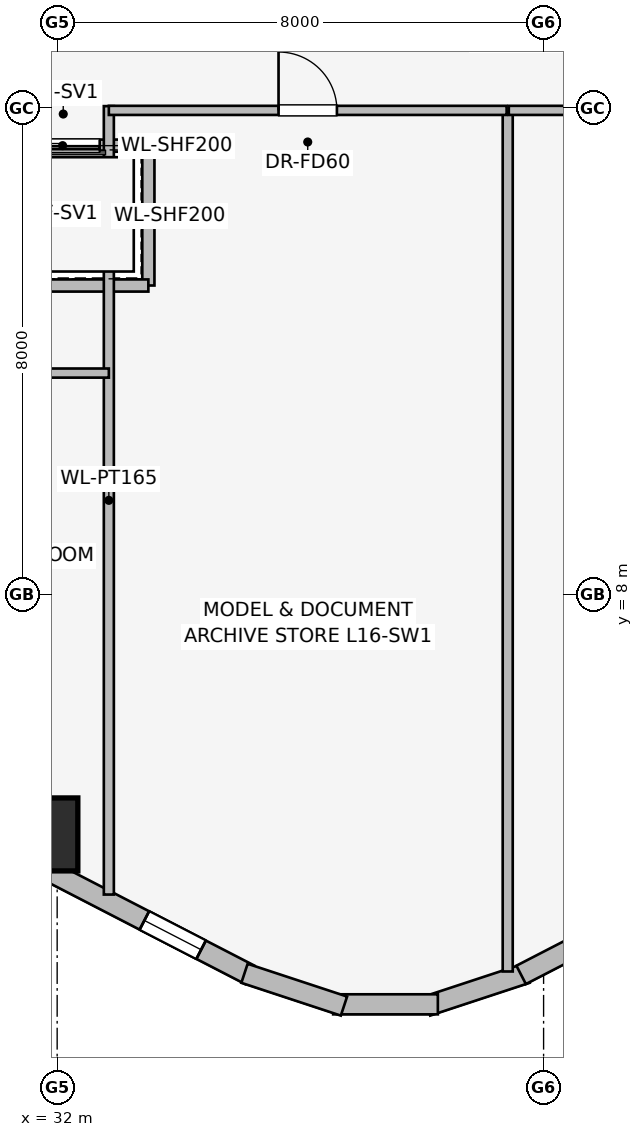
"""IFC4 building model, lengths in metres.
Left out: names, types, materials, properties, quantities, classifications, styles, units other than length and angle.
Written with IfcOpenShell. Run it as: python <this file> out.ifc"""

import sys

from ifc_helpers import new_model, si_unit, direction, frame, frame_2d, origin, origin_2d, place, context, subcontext, project, spatial, rectangle, extrude, element, fill, save


model = new_model("IFC4")
c1 = context("Model", 3, precision=1e-05, world=origin(), true_north=direction((0.0, 1.0)))
c2 = subcontext(c1, "Body", "Model", "MODEL_VIEW")
j1 = project(units=[si_unit("LENGTHUNIT", "METRE"), si_unit("PLANEANGLEUNIT", "RADIAN")], contexts=[c1])
p1 = place(None, origin())
s1 = spatial("IfcSite", under=j1, at=p1, CompositionType="ELEMENT")
p2 = place(p1, origin())
s2 = spatial("IfcBuilding", under=s1, at=p2, CompositionType="ELEMENT")
p3 = place(p2, frame((0.0, 0.0, 63.5)))
s3 = spatial("IfcBuildingStorey", under=s2, at=p3, CompositionType="ELEMENT", Elevation=63.5)
p4 = place(p3, frame((31.74, 4.053, 0.0), z_axis=(0.0, 0.0, 1.0), x_axis=(1.0, 0.0, 0.0)))
e1 = element("IfcColumn", 1, at=p4, inside=s3, PredefinedType="COLUMN", context=c2, shape_type="SweptSolid", body=[
    extrude(rectangle(XDim=1.2, YDim=1.2, at=origin_2d()), origin(), (0.0, 0.0, 1.0), 3.65),
])
p5 = place(p3, frame((35.169, 1.743, 0.0), z_axis=(0.0, 0.0, 1.0), x_axis=(-0.888634413993, 0.458616264721, 0.0)))
e2 = element("IfcWall", 2, at=p5, inside=s3, PredefinedType="STANDARD", context=c2, shape_type="SweptSolid", body=[
    extrude(rectangle(XDim=20.531, YDim=0.34, at=frame_2d((10.266, 0.0))), origin(), (0.0, 0.0, 1.0), 2.684),
])
p6 = place(p5, frame((0.902, 0.0, 0.75)))
e3 = element("IfcOpeningElement", 3, at=p6, cuts=e2, PredefinedType="OPENING", context=c2, shape_type="SweptSolid", body=[
    extrude(rectangle(XDim=1.05, YDim=1.4, at=frame_2d((0.525, 0.7))), frame((0.0, 0.18, 0.0), z_axis=(0.0, -1.0, 0.0), x_axis=(1.0, 0.0, 0.0)), (0.0, 0.0, 1.0), 0.36),
])
p7 = place(p5, frame((5.903, 0.0, 0.75)))
e4 = element("IfcOpeningElement", 4, at=p7, cuts=e2, PredefinedType="OPENING", context=c2, shape_type="SweptSolid", body=[
    extrude(rectangle(XDim=1.5, YDim=1.5, at=frame_2d((0.75, 0.75))), frame((0.0, 0.18, 0.0), z_axis=(0.0, -1.0, 0.0), x_axis=(1.0, 0.0, 0.0)), (0.0, 0.0, 1.0), 0.36),
])
p8 = place(p5, frame((9.516, 0.0, 0.75)))
e5 = element("IfcOpeningElement", 5, at=p8, cuts=e2, PredefinedType="OPENING", context=c2, shape_type="SweptSolid", body=[
    extrude(rectangle(XDim=1.5, YDim=1.5, at=frame_2d((0.75, 0.75))), frame((0.0, 0.18, 0.0), z_axis=(0.0, -1.0, 0.0), x_axis=(1.0, 0.0, 0.0)), (0.0, 0.0, 1.0), 0.36),
])
p9 = place(p5, frame((13.129, 0.0, 0.75)))
e6 = element("IfcOpeningElement", 6, at=p9, cuts=e2, PredefinedType="OPENING", context=c2, shape_type="SweptSolid", body=[
    extrude(rectangle(XDim=1.5, YDim=1.5, at=frame_2d((0.75, 0.75))), frame((0.0, 0.18, 0.0), z_axis=(0.0, -1.0, 0.0), x_axis=(1.0, 0.0, 0.0)), (0.0, 0.0, 1.0), 0.36),
])
p10 = place(p5, frame((17.673, 0.0, 0.75)))
e7 = element("IfcOpeningElement", 7, at=p10, cuts=e2, PredefinedType="OPENING", context=c2, shape_type="SweptSolid", body=[
    extrude(rectangle(XDim=1.8, YDim=1.5, at=frame_2d((0.9, 0.75))), frame((0.0, 0.18, 0.0), z_axis=(0.0, -1.0, 0.0), x_axis=(1.0, 0.0, 0.0)), (0.0, 0.0, 1.0), 0.36),
])
p11 = place(p3, frame((39.719, 1.769, 0.0), z_axis=(0.0, 0.0, 1.0), x_axis=(-0.94976901097, -0.312951794691, 0.0)))
e8 = element("IfcWall", 8, at=p11, inside=s3, PredefinedType="STANDARD", context=c2, shape_type="SweptSolid", body=[
    extrude(rectangle(XDim=1.722, YDim=0.33, at=frame_2d((0.861, 0.0))), origin(), (0.0, 0.0, 1.0), 3.39),
])
p12 = place(p3, frame((38.261, 1.259, 0.0), z_axis=(0.0, 0.0, 1.0), x_axis=(-1.0, 0.0, 0.0)))
e9 = element("IfcWall", 9, at=p12, inside=s3, PredefinedType="STANDARD", context=c2, shape_type="SweptSolid", body=[
    extrude(rectangle(XDim=1.722, YDim=0.33, at=frame_2d((0.861, 0.0))), origin(), (0.0, 0.0, 1.0), 3.39),
])
p13 = place(p3, frame((36.717, 1.23, 0.0), z_axis=(0.0, 0.0, 1.0), x_axis=(-0.94976901097, 0.312951794691, 0.0)))
e10 = element("IfcWall", 10, at=p13, inside=s3, PredefinedType="STANDARD", context=c2, shape_type="SweptSolid", body=[
    extrude(rectangle(XDim=1.722, YDim=0.33, at=frame_2d((0.861, 0.0))), origin(), (0.0, 0.0, 1.0), 3.39),
])
p14 = place(p3, frame((57.876, 11.159, 0.0), z_axis=(0.0, 0.0, 1.0), x_axis=(-0.888634413993, -0.458616264721, 0.0)))
e11 = element("IfcWall", 11, at=p14, inside=s3, PredefinedType="STANDARD", context=c2, shape_type="SweptSolid", body=[
    extrude(rectangle(XDim=20.531, YDim=0.34, at=frame_2d((10.266, 0.0))), origin(), (0.0, 0.0, 1.0), 2.684),
])
p15 = place(p14, frame((1.032, 0.0, 0.75)))
e12 = element("IfcOpeningElement", 12, at=p15, cuts=e11, PredefinedType="OPENING", context=c2, shape_type="SweptSolid", body=[
    extrude(rectangle(XDim=1.8, YDim=1.5, at=frame_2d((0.9, 0.75))), frame((0.0, 0.18, 0.0), z_axis=(0.0, -1.0, 0.0), x_axis=(1.0, 0.0, 0.0)), (0.0, 0.0, 1.0), 0.36),
])
p16 = place(p14, frame((5.082, 0.0, 0.75)))
e13 = element("IfcOpeningElement", 13, at=p16, cuts=e11, PredefinedType="OPENING", context=c2, shape_type="SweptSolid", body=[
    extrude(rectangle(XDim=1.5, YDim=1.5, at=frame_2d((0.75, 0.75))), frame((0.0, 0.18, 0.0), z_axis=(0.0, -1.0, 0.0), x_axis=(1.0, 0.0, 0.0)), (0.0, 0.0, 1.0), 0.36),
])
p17 = place(p14, frame((7.055, 0.0, 0.75)))
e14 = element("IfcOpeningElement", 14, at=p17, cuts=e11, PredefinedType="OPENING", context=c2, shape_type="SweptSolid", body=[
    extrude(rectangle(XDim=1.5, YDim=1.5, at=frame_2d((0.75, 0.75))), frame((0.0, 0.18, 0.0), z_axis=(0.0, -1.0, 0.0), x_axis=(1.0, 0.0, 0.0)), (0.0, 0.0, 1.0), 0.36),
])
p18 = place(p14, frame((10.158, 0.0, 0.75)))
e15 = element("IfcOpeningElement", 15, at=p18, cuts=e11, PredefinedType="OPENING", context=c2, shape_type="SweptSolid", body=[
    extrude(rectangle(XDim=1.8, YDim=1.5, at=frame_2d((0.9, 0.75))), frame((0.0, 0.18, 0.0), z_axis=(0.0, -1.0, 0.0), x_axis=(1.0, 0.0, 0.0)), (0.0, 0.0, 1.0), 0.36),
])
p19 = place(p14, frame((13.243, 0.0, 0.75)))
e16 = element("IfcOpeningElement", 16, at=p19, cuts=e11, PredefinedType="OPENING", context=c2, shape_type="SweptSolid", body=[
    extrude(rectangle(XDim=1.8, YDim=1.5, at=frame_2d((0.9, 0.75))), frame((0.0, 0.18, 0.0), z_axis=(0.0, -1.0, 0.0), x_axis=(1.0, 0.0, 0.0)), (0.0, 0.0, 1.0), 0.36),
])
p20 = place(p14, frame((17.823, 0.0, 0.75)))
e17 = element("IfcOpeningElement", 17, at=p20, cuts=e11, PredefinedType="OPENING", context=c2, shape_type="SweptSolid", body=[
    extrude(rectangle(XDim=1.5, YDim=1.5, at=frame_2d((0.75, 0.75))), frame((0.0, 0.18, 0.0), z_axis=(0.0, -1.0, 0.0), x_axis=(1.0, 0.0, 0.0)), (0.0, 0.0, 1.0), 0.36),
])
p21 = place(p3, frame((33.5, 15.38, 0.0), z_axis=(0.0, 0.0, 1.0), x_axis=(-1.0, 0.0, 0.0)))
e18 = element("IfcWall", 18, at=p21, inside=s3, PredefinedType="PARTITIONING", context=c2, shape_type="SweptSolid", body=[
    extrude(rectangle(XDim=2.82, YDim=0.2, at=frame_2d((1.41, 0.0))), origin(), (0.0, 0.0, 1.0), 3.39),
])
p22 = place(p21, frame((0.8, 0.0, 0.0)))
e19 = element("IfcOpeningElement", 19, at=p22, cuts=e18, PredefinedType="OPENING", context=c2, shape_type="SweptSolid", body=[
    extrude(rectangle(XDim=1.2, YDim=2.2, at=frame_2d((0.6, 1.1))), frame((0.0, 0.11, 0.0), z_axis=(0.0, -1.0, 0.0), x_axis=(1.0, 0.0, 0.0)), (0.0, 0.0, 1.0), 0.22),
])
p23 = place(p3, frame((33.5, 13.08, 0.0), z_axis=(0.0, 0.0, 1.0), x_axis=(0.0, 1.0, 0.0)))
e20 = element("IfcWall", 20, at=p23, inside=s3, PredefinedType="PARTITIONING", context=c2, shape_type="SweptSolid", body=[
    extrude(rectangle(XDim=2.3, YDim=0.2, at=frame_2d((1.15, 0.0))), origin(), (0.0, 0.0, 1.0), 3.39),
])
p24 = place(p3, frame((30.879, 13.08, 0.0), z_axis=(0.0, 0.0, 1.0), x_axis=(1.0, 0.0, 0.0)))
e21 = element("IfcWall", 21, at=p24, inside=s3, PredefinedType="PARTITIONING", context=c2, shape_type="SweptSolid", body=[
    extrude(rectangle(XDim=2.621, YDim=0.2, at=frame_2d((1.311, 0.0))), origin(), (0.0, 0.0, 1.0), 3.39),
])
p25 = place(p3, frame((32.85, 3.064, 0.0), z_axis=(0.0, 0.0, 1.0), x_axis=(0.0, 1.0, 0.0)))
e22 = element("IfcWall", 22, at=p25, inside=s3, PredefinedType="PARTITIONING", context=c2, shape_type="SweptSolid", body=[
    extrude(rectangle(XDim=12.966, YDim=0.165, at=frame_2d((6.483, 0.0))), origin(), (0.0, 0.0, 1.0), 3.39),
])
p26 = place(p3, frame((16.487, 11.64, 0.0), z_axis=(0.0, 0.0, 1.0), x_axis=(1.0, 0.0, 0.0)))
e23 = element("IfcWall", 23, at=p26, inside=s3, PredefinedType="PARTITIONING", context=c2, shape_type="SweptSolid", body=[
    extrude(rectangle(XDim=16.363, YDim=0.15, at=frame_2d((8.182, 0.0))), origin(), (0.0, 0.0, 1.0), 3.39),
])
p27 = place(p26, frame((6.513, 0.0, 0.0)))
e24 = element("IfcOpeningElement", 24, at=p27, cuts=e23, PredefinedType="OPENING", context=c2, shape_type="SweptSolid", body=[
    extrude(rectangle(XDim=0.9, YDim=2.0, at=frame_2d((0.45, 1.0))), frame((0.0, 0.085, 0.0), z_axis=(0.0, -1.0, 0.0), x_axis=(1.0, 0.0, 0.0)), (0.0, 0.0, 1.0), 0.17),
])
p28 = place(p3, frame((39.41, 1.799, 0.0), z_axis=(0.0, 0.0, 1.0), x_axis=(0.0, 1.0, 0.0)))
e25 = element("IfcWall", 25, at=p28, inside=s3, PredefinedType="PARTITIONING", context=c2, shape_type="SweptSolid", body=[
    extrude(rectangle(XDim=14.131, YDim=0.165, at=frame_2d((7.065, 0.0))), origin(), (0.0, 0.0, 1.0), 3.39),
])
p29 = place(p3, frame((32.85, 15.96, 0.0), z_axis=(0.0, 0.0, 1.0), x_axis=(1.0, 0.0, 0.0)))
e26 = element("IfcWall", 26, at=p29, inside=s3, PredefinedType="PARTITIONING", context=c2, shape_type="SweptSolid", body=[
    extrude(rectangle(XDim=6.542, YDim=0.15, at=frame_2d((3.271, 0.0))), origin(), (0.0, 0.0, 1.0), 3.39),
])
p30 = place(p29, frame((2.791, 0.0, 0.0)))
e27 = element("IfcOpeningElement", 27, at=p30, cuts=e26, PredefinedType="OPENING", context=c2, shape_type="SweptSolid", body=[
    extrude(rectangle(XDim=0.96, YDim=2.0, at=frame_2d((0.48, 1.0))), frame((0.0, 0.085, 0.0), z_axis=(0.0, -1.0, 0.0), x_axis=(1.0, 0.0, 0.0)), (0.0, 0.0, 1.0), 0.17),
])
p31 = place(p3, frame((39.428, 15.96, 0.0), z_axis=(0.0, 0.0, 1.0), x_axis=(1.0, 0.0, 0.0)))
e28 = element("IfcWall", 28, at=p31, inside=s3, PredefinedType="PARTITIONING", context=c2, shape_type="SweptSolid", body=[
    extrude(rectangle(XDim=10.241, YDim=0.15, at=frame_2d((5.121, 0.0))), origin(), (0.0, 0.0, 1.0), 3.39),
])
p32 = place(p31, frame((4.641, 0.0, 0.0)))
e29 = element("IfcOpeningElement", 29, at=p32, cuts=e28, PredefinedType="OPENING", context=c2, shape_type="SweptSolid", body=[
    extrude(rectangle(XDim=0.96, YDim=2.0, at=frame_2d((0.48, 1.0))), frame((0.0, 0.085, 0.0), z_axis=(0.0, -1.0, 0.0), x_axis=(1.0, 0.0, 0.0)), (0.0, 0.0, 1.0), 0.17),
])
p33 = place(p6, origin())
e30 = element("IfcWindow", 30, at=p33, inside=s3, PartitioningType="SINGLE_PANEL", PredefinedType="WINDOW", context=c2, shape_type="SweptSolid", body=[
    extrude(rectangle(XDim=1.05, YDim=1.4, at=frame_2d((0.525, 0.7))), frame((0.0, 0.03, 0.0), z_axis=(0.0, -1.0, 0.0), x_axis=(1.0, 0.0, 0.0)), (0.0, 0.0, 1.0), 0.06),
])
fill(e3, e30)
p34 = place(p22, origin())
e31 = element("IfcDoor", 31, at=p34, inside=s3, OperationType="SLIDING_TO_RIGHT", PredefinedType="DOOR", context=c2, shape_type="SweptSolid", body=[
    extrude(rectangle(XDim=1.2, YDim=2.2, at=frame_2d((0.6, 1.1))), frame((0.0, 0.025, 0.0), z_axis=(0.0, -1.0, 0.0), x_axis=(1.0, 0.0, 0.0)), (0.0, 0.0, 1.0), 0.05),
])
fill(e19, e31)
p35 = place(p30, origin())
e32 = element("IfcDoor", 32, at=p35, inside=s3, OperationType="SINGLE_SWING_LEFT", PredefinedType="DOOR", context=c2, shape_type="SweptSolid", body=[
    extrude(rectangle(XDim=0.96, YDim=2.0, at=frame_2d((0.48, 1.0))), frame((0.0, 0.025, 0.0), z_axis=(0.0, -1.0, 0.0), x_axis=(1.0, 0.0, 0.0)), (0.0, 0.0, 1.0), 0.05),
])
fill(e27, e32)
save(model, sys.argv[1])
